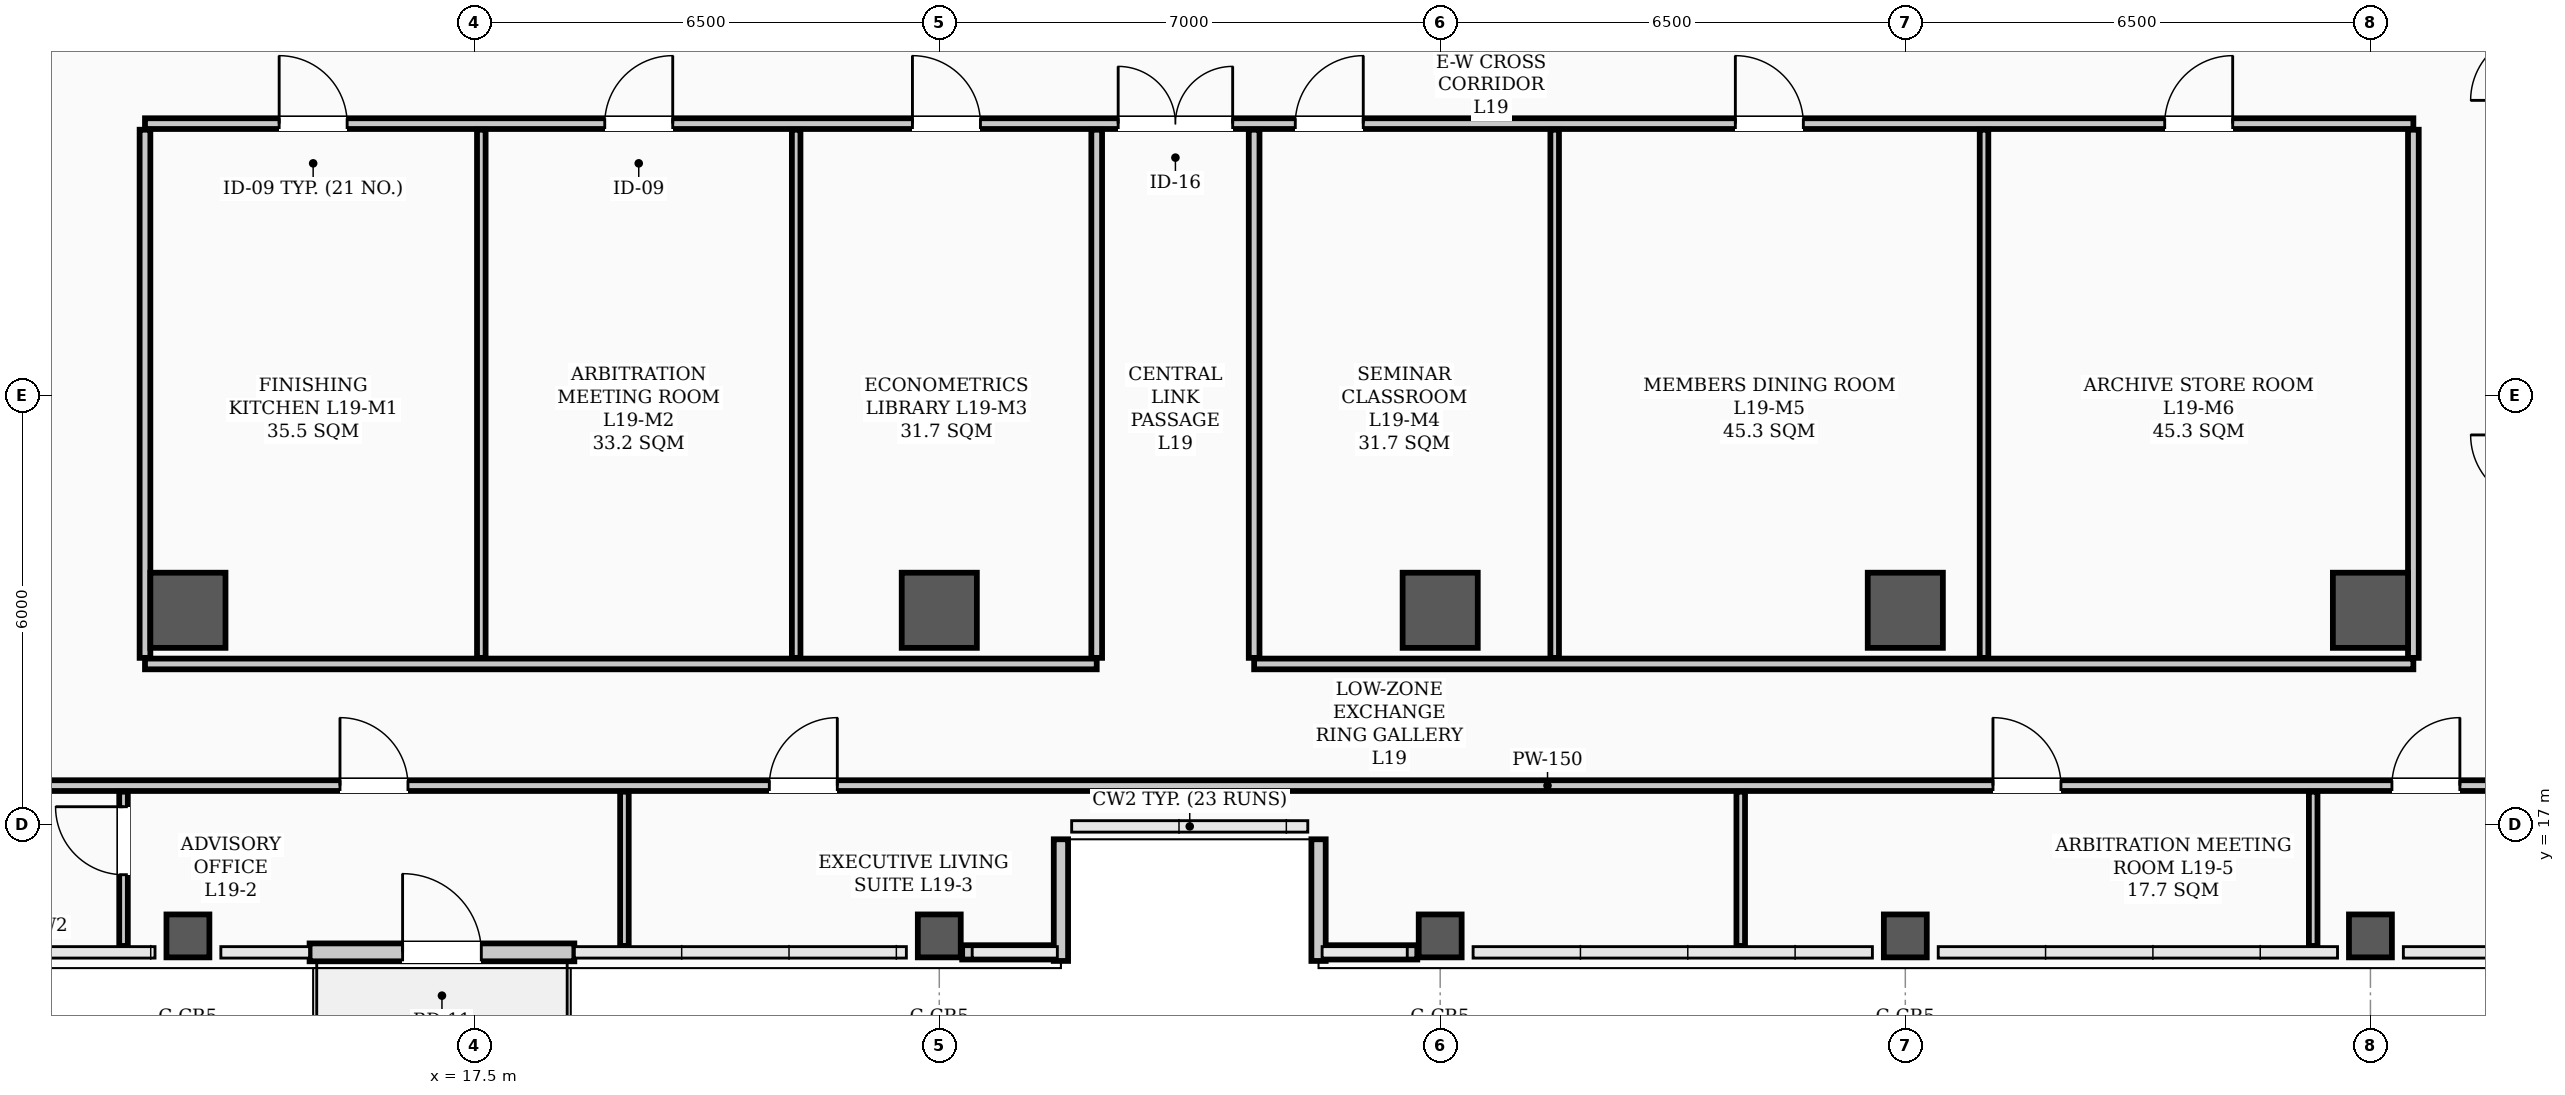
"""IFC4 building model, lengths in metres.
Left out: names, types, materials, properties, quantities, classifications, styles, units other than length and angle.
Written with IfcOpenShell. Run it as: python <this file> out.ifc"""

import sys

from ifc_helpers import new_model, si_unit, direction, frame, frame_2d, origin, origin_2d, place, context, subcontext, project, spatial, rectangle, hollow_rectangle, extrude, element, fill, save


model = new_model("IFC4")
c1 = context("Model", 3, precision=1e-05, world=origin(), true_north=direction((0.0, 1.0)))
c2 = subcontext(c1, "Body", "Model", "MODEL_VIEW")
j1 = project(units=[si_unit("LENGTHUNIT", "METRE"), si_unit("PLANEANGLEUNIT", "RADIAN")], contexts=[c1])
p1 = place(None, origin())
s1 = spatial("IfcSite", under=j1, at=p1, CompositionType="ELEMENT")
p2 = place(p1, origin())
s2 = spatial("IfcBuilding", under=s1, at=p2, CompositionType="ELEMENT")
p3 = place(p2, frame((0.0, 0.0, 77.2)))
s3 = spatial("IfcBuildingStorey", under=s2, at=p3, CompositionType="ELEMENT", Elevation=77.2)
for number, where, z_axis, x_axis in (
    (1, (13.5, 20.0, 0.0), (0.0, 0.0, 1.0), (1.0, 0.0, 0.0)),
    (2, (24.0, 20.0, 0.0), (0.0, 0.0, 1.0), (1.0, 0.0, 0.0)),
    (3, (31.0, 20.0, 0.0), (0.0, 0.0, 1.0), (1.0, 0.0, 0.0)),
    (4, (37.5, 20.0, 0.0), (0.0, 0.0, 1.0), (1.0, 0.0, 0.0)),
    (5, (44.0, 20.0, 0.0), (0.0, 0.0, 1.0), (1.0, 0.0, 0.0)),
):
    element("IfcColumn", number, at=place(p3, frame(where, z_axis=z_axis, x_axis=x_axis)), inside=s3, PredefinedType="COLUMN", context=c2, shape_type="SweptSolid", body=[
        extrude(hollow_rectangle(XDim=1.05, YDim=1.05, WallThickness=0.038, InnerFilletRadius=0.019, OuterFilletRadius=0.057, at=origin_2d()), origin(), (0.0, 0.0, 1.0), 3.9),
    ])
for number, where, z_axis, x_axis in (
    (6, (13.5, 15.45, 0.0), (0.0, 0.0, 1.0), (1.0, 0.0, 0.0)),
    (7, (24.0, 15.45, 0.0), (0.0, 0.0, 1.0), (1.0, 0.0, 0.0)),
    (8, (31.0, 15.45, 0.0), (0.0, 0.0, 1.0), (1.0, 0.0, 0.0)),
    (9, (37.5, 15.45, 0.0), (0.0, 0.0, 1.0), (1.0, 0.0, 0.0)),
    (10, (44.0, 15.45, 0.0), (0.0, 0.0, 1.0), (1.0, 0.0, 0.0)),
):
    element("IfcColumn", number, at=place(p3, frame(where, z_axis=z_axis, x_axis=x_axis)), inside=s3, PredefinedType="COLUMN", context=c2, shape_type="SweptSolid", body=[
        extrude(hollow_rectangle(XDim=0.6, YDim=0.6, WallThickness=0.026, InnerFilletRadius=0.013, OuterFilletRadius=0.039, at=origin_2d()), origin(), (0.0, 0.0, 1.0), 3.9),
    ])
for number, where, z_axis, x_axis in (
    (11, (24.32, 15.22, 0.0), (0.0, 0.0, 1.0), (1.0, 0.0, 0.0)),
    (12, (29.35, 15.22, 0.0), (0.0, 0.0, 1.0), (1.0, 0.0, 0.0)),
):
    element("IfcWall", number, at=place(p3, frame(where, z_axis=z_axis, x_axis=x_axis)), inside=s3, PredefinedType="PARAPET", context=c2, shape_type="SweptSolid", body=[
        extrude(rectangle(XDim=1.33, YDim=0.2, at=frame_2d((0.665, 0.0))), origin(), (0.0, 0.0, 1.0), 1.2),
    ])
for number, where, z_axis, x_axis in (
    (13, (25.7, 15.1, 0.0), (0.0, 0.0, 1.0), (0.0, 1.0, 0.0)),
    (14, (29.3, 16.8, 0.0), (0.0, 0.0, 1.0), (0.0, -1.0, 0.0)),
):
    element("IfcWall", number, at=place(p3, frame(where, z_axis=z_axis, x_axis=x_axis)), inside=s3, PredefinedType="PARAPET", context=c2, shape_type="SweptSolid", body=[
        extrude(rectangle(XDim=1.7, YDim=0.2, at=frame_2d((0.85, 0.0))), origin(), (0.0, 0.0, 1.0), 1.2),
    ])
p4 = place(p3, frame((15.2, 15.22, 0.0), z_axis=(0.0, 0.0, 1.0), x_axis=(1.0, 0.0, 0.0)))
e15 = element("IfcWall", 15, at=p4, inside=s3, PredefinedType="STANDARD", context=c2, shape_type="SweptSolid", body=[
    extrude(rectangle(XDim=3.7, YDim=0.25, at=frame_2d((1.85, 0.0))), origin(), (0.0, 0.0, 1.0), 2.22),
])
p5 = place(p4, frame((1.3, 0.0, 0.0)))
e16 = element("IfcOpeningElement", 16, at=p5, cuts=e15, PredefinedType="OPENING", context=c2, shape_type="SweptSolid", body=[
    extrude(rectangle(XDim=1.1, YDim=2.2, at=frame_2d((0.55, 1.1))), frame((0.0, 0.135, 0.0), z_axis=(0.0, -1.0, 0.0), x_axis=(1.0, 0.0, 0.0)), (0.0, 0.0, 1.0), 0.27),
])
p6 = place(p3, frame((12.9, 26.8, 0.0), z_axis=(0.0, 0.0, 1.0), x_axis=(1.0, 0.0, 0.0)))
e17 = element("IfcWall", 17, at=p6, inside=s3, PredefinedType="PARTITIONING", context=c2, shape_type="SweptSolid", body=[
    extrude(rectangle(XDim=31.7, YDim=0.15, at=frame_2d((15.85, 0.0))), origin(), (0.0, 0.0, 1.0), 2.24),
])
p7 = place(p6, frame((13.6, 0.0, 0.0)))
e18 = element("IfcOpeningElement", 18, at=p7, cuts=e17, PredefinedType="OPENING", context=c2, shape_type="SweptSolid", body=[
    extrude(rectangle(XDim=1.6, YDim=2.08, at=frame_2d((0.8, 1.04))), frame((0.0, 0.085, 0.0), z_axis=(0.0, -1.0, 0.0), x_axis=(1.0, 0.0, 0.0)), (0.0, 0.0, 1.0), 0.17),
])
p8 = place(p6, frame((1.875, 0.0, 0.0)))
e19 = element("IfcOpeningElement", 19, at=p8, cuts=e17, PredefinedType="OPENING", context=c2, shape_type="SweptSolid", body=[
    extrude(rectangle(XDim=0.95, YDim=2.08, at=frame_2d((0.475, 1.04))), frame((0.0, 0.085, 0.0), z_axis=(0.0, -1.0, 0.0), x_axis=(1.0, 0.0, 0.0)), (0.0, 0.0, 1.0), 0.17),
])
p9 = place(p6, frame((6.425, 0.0, 0.0)))
e20 = element("IfcOpeningElement", 20, at=p9, cuts=e17, PredefinedType="OPENING", context=c2, shape_type="SweptSolid", body=[
    extrude(rectangle(XDim=0.95, YDim=2.08, at=frame_2d((0.475, 1.04))), frame((0.0, 0.085, 0.0), z_axis=(0.0, -1.0, 0.0), x_axis=(1.0, 0.0, 0.0)), (0.0, 0.0, 1.0), 0.17),
])
p10 = place(p6, frame((10.725, 0.0, 0.0)))
e21 = element("IfcOpeningElement", 21, at=p10, cuts=e17, PredefinedType="OPENING", context=c2, shape_type="SweptSolid", body=[
    extrude(rectangle(XDim=0.95, YDim=2.08, at=frame_2d((0.475, 1.04))), frame((0.0, 0.085, 0.0), z_axis=(0.0, -1.0, 0.0), x_axis=(1.0, 0.0, 0.0)), (0.0, 0.0, 1.0), 0.17),
])
p11 = place(p6, frame((16.075, 0.0, 0.0)))
e22 = element("IfcOpeningElement", 22, at=p11, cuts=e17, PredefinedType="OPENING", context=c2, shape_type="SweptSolid", body=[
    extrude(rectangle(XDim=0.95, YDim=2.08, at=frame_2d((0.475, 1.04))), frame((0.0, 0.085, 0.0), z_axis=(0.0, -1.0, 0.0), x_axis=(1.0, 0.0, 0.0)), (0.0, 0.0, 1.0), 0.17),
])
p12 = place(p6, frame((22.225, 0.0, 0.0)))
e23 = element("IfcOpeningElement", 23, at=p12, cuts=e17, PredefinedType="OPENING", context=c2, shape_type="SweptSolid", body=[
    extrude(rectangle(XDim=0.95, YDim=2.08, at=frame_2d((0.475, 1.04))), frame((0.0, 0.085, 0.0), z_axis=(0.0, -1.0, 0.0), x_axis=(1.0, 0.0, 0.0)), (0.0, 0.0, 1.0), 0.17),
])
p13 = place(p6, frame((28.225, 0.0, 0.0)))
e24 = element("IfcOpeningElement", 24, at=p13, cuts=e17, PredefinedType="OPENING", context=c2, shape_type="SweptSolid", body=[
    extrude(rectangle(XDim=0.95, YDim=2.08, at=frame_2d((0.475, 1.04))), frame((0.0, 0.085, 0.0), z_axis=(0.0, -1.0, 0.0), x_axis=(1.0, 0.0, 0.0)), (0.0, 0.0, 1.0), 0.17),
])
p14 = place(p3, frame((10.16, 17.55, 0.0), z_axis=(0.0, 0.0, 1.0), x_axis=(1.0, 0.0, 0.0)))
e25 = element("IfcWall", 25, at=p14, inside=s3, PredefinedType="PARTITIONING", context=c2, shape_type="SweptSolid", body=[
    extrude(rectangle(XDim=44.68, YDim=0.15, at=frame_2d((22.34, 0.0))), origin(), (0.0, 0.0, 1.0), 2.24),
])
p15 = place(p14, frame((5.465, 0.0, 0.0)))
e26 = element("IfcOpeningElement", 26, at=p15, cuts=e25, PredefinedType="OPENING", context=c2, shape_type="SweptSolid", body=[
    extrude(rectangle(XDim=0.95, YDim=2.08, at=frame_2d((0.475, 1.04))), frame((0.0, 0.085, 0.0), z_axis=(0.0, -1.0, 0.0), x_axis=(1.0, 0.0, 0.0)), (0.0, 0.0, 1.0), 0.17),
])
p16 = place(p14, frame((11.465, 0.0, 0.0)))
e27 = element("IfcOpeningElement", 27, at=p16, cuts=e25, PredefinedType="OPENING", context=c2, shape_type="SweptSolid", body=[
    extrude(rectangle(XDim=0.95, YDim=2.08, at=frame_2d((0.475, 1.04))), frame((0.0, 0.085, 0.0), z_axis=(0.0, -1.0, 0.0), x_axis=(1.0, 0.0, 0.0)), (0.0, 0.0, 1.0), 0.17),
])
p17 = place(p14, frame((28.565, 0.0, 0.0)))
e28 = element("IfcOpeningElement", 28, at=p17, cuts=e25, PredefinedType="OPENING", context=c2, shape_type="SweptSolid", body=[
    extrude(rectangle(XDim=0.95, YDim=2.08, at=frame_2d((0.475, 1.04))), frame((0.0, 0.085, 0.0), z_axis=(0.0, -1.0, 0.0), x_axis=(1.0, 0.0, 0.0)), (0.0, 0.0, 1.0), 0.17),
])
p18 = place(p14, frame((34.14, 0.0, 0.0)))
e29 = element("IfcOpeningElement", 29, at=p18, cuts=e25, PredefinedType="OPENING", context=c2, shape_type="SweptSolid", body=[
    extrude(rectangle(XDim=0.95, YDim=2.08, at=frame_2d((0.475, 1.04))), frame((0.0, 0.085, 0.0), z_axis=(0.0, -1.0, 0.0), x_axis=(1.0, 0.0, 0.0)), (0.0, 0.0, 1.0), 0.17),
])
p19 = place(p3, frame((12.9, 19.25, 0.0), z_axis=(0.0, 0.0, 1.0), x_axis=(1.0, 0.0, 0.0)))
e30 = element("IfcWall", 30, at=p19, inside=s3, PredefinedType="PARTITIONING", context=c2, shape_type="SweptSolid", body=[
    extrude(rectangle(XDim=13.3, YDim=0.15, at=frame_2d((6.65, 0.0))), origin(), (0.0, 0.0, 1.0), 2.24),
])
p20 = place(p3, frame((28.4, 19.25, 0.0), z_axis=(0.0, 0.0, 1.0), x_axis=(1.0, 0.0, 0.0)))
e31 = element("IfcWall", 31, at=p20, inside=s3, PredefinedType="PARTITIONING", context=c2, shape_type="SweptSolid", body=[
    extrude(rectangle(XDim=16.2, YDim=0.15, at=frame_2d((8.1, 0.0))), origin(), (0.0, 0.0, 1.0), 2.24),
])
for number, where, z_axis, x_axis in (
    (32, (26.2, 19.335, 0.0), (0.0, 0.0, 1.0), (0.0, 1.0, 0.0)),
    (33, (28.4, 19.335, 0.0), (0.0, 0.0, 1.0), (0.0, 1.0, 0.0)),
    (34, (12.9, 19.335, 0.0), (0.0, 0.0, 1.0), (0.0, 1.0, 0.0)),
    (35, (44.6, 19.335, 0.0), (0.0, 0.0, 1.0), (0.0, 1.0, 0.0)),
):
    element("IfcWall", number, at=place(p3, frame(where, z_axis=z_axis, x_axis=x_axis)), inside=s3, PredefinedType="PARTITIONING", context=c2, shape_type="SweptSolid", body=[
        extrude(rectangle(XDim=7.38, YDim=0.15, at=frame_2d((3.69, 0.0))), origin(), (0.0, 0.0, 1.0), 2.24),
    ])
p21 = place(p3, frame((12.6, 15.31, 0.0), z_axis=(0.0, 0.0, 1.0), x_axis=(0.0, 1.0, 0.0)))
e36 = element("IfcWall", 36, at=p21, inside=s3, PredefinedType="PARTITIONING", context=c2, shape_type="SweptSolid", body=[
    extrude(rectangle(XDim=2.155, YDim=0.12, at=frame_2d((1.078, 0.0))), origin(), (0.0, 0.0, 1.0), 3.66),
])
p22 = place(p21, frame((0.995, 0.0, 0.0)))
e37 = element("IfcOpeningElement", 37, at=p22, cuts=e36, PredefinedType="OPENING", context=c2, shape_type="SweptSolid", body=[
    extrude(rectangle(XDim=0.95, YDim=2.08, at=frame_2d((0.475, 1.04))), frame((0.0, 0.07, 0.0), z_axis=(0.0, -1.0, 0.0), x_axis=(1.0, 0.0, 0.0)), (0.0, 0.0, 1.0), 0.14),
])
for number, where, z_axis, x_axis in (
    (38, (19.6, 15.31, 0.0), (0.0, 0.0, 1.0), (0.0, 1.0, 0.0)),
    (39, (35.2, 15.31, 0.0), (0.0, 0.0, 1.0), (0.0, 1.0, 0.0)),
    (40, (43.2, 15.31, 0.0), (0.0, 0.0, 1.0), (0.0, 1.0, 0.0)),
):
    element("IfcWall", number, at=place(p3, frame(where, z_axis=z_axis, x_axis=x_axis)), inside=s3, PredefinedType="PARTITIONING", context=c2, shape_type="SweptSolid", body=[
        extrude(rectangle(XDim=2.155, YDim=0.12, at=frame_2d((1.078, 0.0))), origin(), (0.0, 0.0, 1.0), 3.24),
    ])
for number, where, z_axis, x_axis in (
    (41, (17.6, 19.335, 0.0), (0.0, 0.0, 1.0), (0.0, 1.0, 0.0)),
    (42, (22.0, 19.335, 0.0), (0.0, 0.0, 1.0), (0.0, 1.0, 0.0)),
    (43, (32.6, 19.335, 0.0), (0.0, 0.0, 1.0), (0.0, 1.0, 0.0)),
    (44, (38.6, 19.335, 0.0), (0.0, 0.0, 1.0), (0.0, 1.0, 0.0)),
):
    element("IfcWall", number, at=place(p3, frame(where, z_axis=z_axis, x_axis=x_axis)), inside=s3, PredefinedType="PARTITIONING", context=c2, shape_type="SweptSolid", body=[
        extrude(rectangle(XDim=7.38, YDim=0.12, at=frame_2d((3.69, 0.0))), origin(), (0.0, 0.0, 1.0), 2.24),
    ])
p23 = place(p5, origin())
e45 = element("IfcDoor", 45, at=p23, inside=s3, OperationType="SINGLE_SWING_LEFT", PredefinedType="DOOR", context=c2, shape_type="SweptSolid", body=[
    extrude(rectangle(XDim=1.1, YDim=2.2, at=frame_2d((0.55, 1.1))), frame((0.0, 0.025, 0.0), z_axis=(0.0, -1.0, 0.0), x_axis=(1.0, 0.0, 0.0)), (0.0, 0.0, 1.0), 0.05),
])
fill(e16, e45)
p24 = place(p7, origin())
e46 = element("IfcDoor", 46, at=p24, inside=s3, OperationType="DOUBLE_DOOR_SINGLE_SWING", PredefinedType="DOOR", context=c2, shape_type="SweptSolid", body=[
    extrude(rectangle(XDim=1.6, YDim=2.08, at=frame_2d((0.8, 1.04))), frame((0.0, 0.025, 0.0), z_axis=(0.0, -1.0, 0.0), x_axis=(1.0, 0.0, 0.0)), (0.0, 0.0, 1.0), 0.05),
])
fill(e18, e46)
p25 = place(p22, origin())
e47 = element("IfcDoor", 47, at=p25, inside=s3, OperationType="SINGLE_SWING_RIGHT", PredefinedType="DOOR", context=c2, shape_type="SweptSolid", body=[
    extrude(rectangle(XDim=0.95, YDim=2.08, at=frame_2d((0.475, 1.04))), frame((0.0, 0.025, 0.0), z_axis=(0.0, -1.0, 0.0), x_axis=(1.0, 0.0, 0.0)), (0.0, 0.0, 1.0), 0.05),
])
fill(e37, e47)
p26 = place(p15, origin())
e48 = element("IfcDoor", 48, at=p26, inside=s3, OperationType="SINGLE_SWING_LEFT", PredefinedType="DOOR", context=c2, shape_type="SweptSolid", body=[
    extrude(rectangle(XDim=0.95, YDim=2.08, at=frame_2d((0.475, 1.04))), frame((0.0, 0.025, 0.0), z_axis=(0.0, -1.0, 0.0), x_axis=(1.0, 0.0, 0.0)), (0.0, 0.0, 1.0), 0.05),
])
fill(e26, e48)
p27 = place(p16, origin())
e49 = element("IfcDoor", 49, at=p27, inside=s3, OperationType="SINGLE_SWING_RIGHT", PredefinedType="DOOR", context=c2, shape_type="SweptSolid", body=[
    extrude(rectangle(XDim=0.95, YDim=2.08, at=frame_2d((0.475, 1.04))), frame((0.0, 0.025, 0.0), z_axis=(0.0, -1.0, 0.0), x_axis=(1.0, 0.0, 0.0)), (0.0, 0.0, 1.0), 0.05),
])
fill(e27, e49)
p28 = place(p17, origin())
e50 = element("IfcDoor", 50, at=p28, inside=s3, OperationType="SINGLE_SWING_LEFT", PredefinedType="DOOR", context=c2, shape_type="SweptSolid", body=[
    extrude(rectangle(XDim=0.95, YDim=2.08, at=frame_2d((0.475, 1.04))), frame((0.0, 0.025, 0.0), z_axis=(0.0, -1.0, 0.0), x_axis=(1.0, 0.0, 0.0)), (0.0, 0.0, 1.0), 0.05),
])
fill(e28, e50)
p29 = place(p18, origin())
e51 = element("IfcDoor", 51, at=p29, inside=s3, OperationType="SINGLE_SWING_RIGHT", PredefinedType="DOOR", context=c2, shape_type="SweptSolid", body=[
    extrude(rectangle(XDim=0.95, YDim=2.08, at=frame_2d((0.475, 1.04))), frame((0.0, 0.025, 0.0), z_axis=(0.0, -1.0, 0.0), x_axis=(1.0, 0.0, 0.0)), (0.0, 0.0, 1.0), 0.05),
])
fill(e29, e51)
p30 = place(p8, origin())
e52 = element("IfcDoor", 52, at=p30, inside=s3, OperationType="SINGLE_SWING_LEFT", PredefinedType="DOOR", context=c2, shape_type="SweptSolid", body=[
    extrude(rectangle(XDim=0.95, YDim=2.08, at=frame_2d((0.475, 1.04))), frame((0.0, 0.025, 0.0), z_axis=(0.0, -1.0, 0.0), x_axis=(1.0, 0.0, 0.0)), (0.0, 0.0, 1.0), 0.05),
])
fill(e19, e52)
p31 = place(p9, origin())
e53 = element("IfcDoor", 53, at=p31, inside=s3, OperationType="SINGLE_SWING_RIGHT", PredefinedType="DOOR", context=c2, shape_type="SweptSolid", body=[
    extrude(rectangle(XDim=0.95, YDim=2.08, at=frame_2d((0.475, 1.04))), frame((0.0, 0.025, 0.0), z_axis=(0.0, -1.0, 0.0), x_axis=(1.0, 0.0, 0.0)), (0.0, 0.0, 1.0), 0.05),
])
fill(e20, e53)
p32 = place(p10, origin())
e54 = element("IfcDoor", 54, at=p32, inside=s3, OperationType="SINGLE_SWING_LEFT", PredefinedType="DOOR", context=c2, shape_type="SweptSolid", body=[
    extrude(rectangle(XDim=0.95, YDim=2.08, at=frame_2d((0.475, 1.04))), frame((0.0, 0.025, 0.0), z_axis=(0.0, -1.0, 0.0), x_axis=(1.0, 0.0, 0.0)), (0.0, 0.0, 1.0), 0.05),
])
fill(e21, e54)
p33 = place(p11, origin())
e55 = element("IfcDoor", 55, at=p33, inside=s3, OperationType="SINGLE_SWING_RIGHT", PredefinedType="DOOR", context=c2, shape_type="SweptSolid", body=[
    extrude(rectangle(XDim=0.95, YDim=2.08, at=frame_2d((0.475, 1.04))), frame((0.0, 0.025, 0.0), z_axis=(0.0, -1.0, 0.0), x_axis=(1.0, 0.0, 0.0)), (0.0, 0.0, 1.0), 0.05),
])
fill(e22, e55)
p34 = place(p12, origin())
e56 = element("IfcDoor", 56, at=p34, inside=s3, OperationType="SINGLE_SWING_LEFT", PredefinedType="DOOR", context=c2, shape_type="SweptSolid", body=[
    extrude(rectangle(XDim=0.95, YDim=2.08, at=frame_2d((0.475, 1.04))), frame((0.0, 0.025, 0.0), z_axis=(0.0, -1.0, 0.0), x_axis=(1.0, 0.0, 0.0)), (0.0, 0.0, 1.0), 0.05),
])
fill(e23, e56)
p35 = place(p13, origin())
e57 = element("IfcDoor", 57, at=p35, inside=s3, OperationType="SINGLE_SWING_RIGHT", PredefinedType="DOOR", context=c2, shape_type="SweptSolid", body=[
    extrude(rectangle(XDim=0.95, YDim=2.08, at=frame_2d((0.475, 1.04))), frame((0.0, 0.025, 0.0), z_axis=(0.0, -1.0, 0.0), x_axis=(1.0, 0.0, 0.0)), (0.0, 0.0, 1.0), 0.05),
])
fill(e24, e57)
save(model, sys.argv[1])
